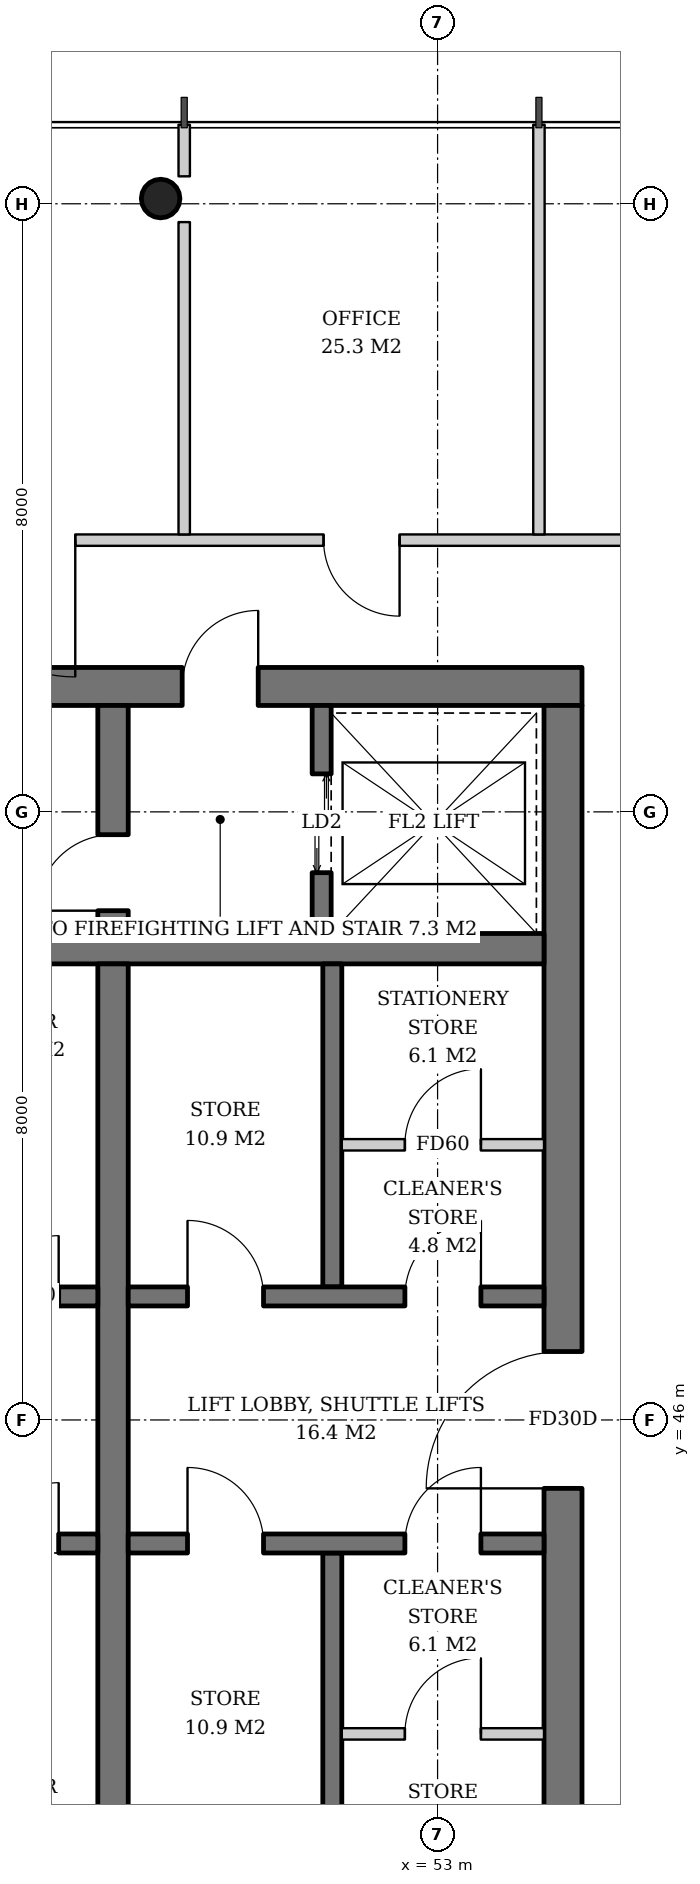
"""IFC4 building model, lengths in metres.
Left out: names, types, materials, properties, quantities, classifications, styles, units other than length and angle.
Written with IfcOpenShell. Run it as: python <this file> out.ifc"""

import sys

from ifc_helpers import new_model, si_unit, direction, frame, frame_2d, origin, origin_2d, place, context, subcontext, project, spatial, rectangle, hollow_circle, extrude, element, fill, save


model = new_model("IFC4")
c1 = context("Model", 3, precision=1e-05, world=origin(), true_north=direction((0.0, 1.0)))
c2 = subcontext(c1, "Body", "Model", "MODEL_VIEW")
j1 = project(units=[si_unit("LENGTHUNIT", "METRE"), si_unit("PLANEANGLEUNIT", "RADIAN")], contexts=[c1])
p1 = place(None, origin())
s1 = spatial("IfcSite", under=j1, at=p1, CompositionType="ELEMENT")
p2 = place(p1, origin())
s2 = spatial("IfcBuilding", under=s1, at=p2, CompositionType="ELEMENT")
p3 = place(p2, frame((0.0, 0.0, 268.0)))
s3 = spatial("IfcBuildingStorey", under=s2, at=p3, CompositionType="ELEMENT", Elevation=268.0)
p4 = place(p3, frame((49.369, 62.107, 0.0), z_axis=(-0.010658893366, -0.031976680097, 0.999431778523), x_axis=(0.948683298051, -0.316227766017, 0.0)))
e1 = element("IfcColumn", 1, at=p4, inside=s3, PredefinedType="COLUMN", context=c2, shape_type="SweptSolid", body=[
    extrude(hollow_circle(Radius=0.254, WallThickness=0.02, at=origin_2d()), origin(), (0.0, 0.0, 1.0), 3.802),
])
p5 = place(p3, frame((35.1, 55.65, 0.0), z_axis=(0.0, 0.0, 1.0), x_axis=(1.0, 0.0, 0.0)))
e2 = element("IfcWall", 2, at=p5, inside=s3, PredefinedType="SHEAR", context=c2, shape_type="SweptSolid", body=[
    extrude(rectangle(XDim=19.8, YDim=0.5, at=frame_2d((9.9, 0.0))), origin(), (0.0, 0.0, 1.0), 3.8),
])
p6 = place(p5, frame((14.54, 0.0, 0.0)))
e3 = element("IfcOpeningElement", 3, at=p6, cuts=e2, PredefinedType="OPENING", context=c2, shape_type="SweptSolid", body=[
    extrude(rectangle(XDim=1.0, YDim=2.1, at=frame_2d((0.5, 1.05))), frame((0.0, 0.26, 0.0), z_axis=(0.0, -1.0, 0.0), x_axis=(1.0, 0.0, 0.0)), (0.0, 0.0, 1.0), 0.52),
])
p7 = place(p5, frame((1.75, 0.0, 0.0)))
e4 = element("IfcOpeningElement", 4, at=p7, cuts=e2, PredefinedType="OPENING", context=c2, shape_type="SweptSolid", body=[
    extrude(rectangle(XDim=1.0, YDim=2.1, at=frame_2d((0.5, 1.05))), frame((0.0, 0.26, 0.0), z_axis=(0.0, -1.0, 0.0), x_axis=(1.0, 0.0, 0.0)), (0.0, 0.0, 1.0), 0.52),
])
p8 = place(p5, frame((3.705, 0.0, 0.0)))
e5 = element("IfcOpeningElement", 5, at=p8, cuts=e2, PredefinedType="OPENING", context=c2, shape_type="SweptSolid", body=[
    extrude(rectangle(XDim=1.0, YDim=2.1, at=frame_2d((0.5, 1.05))), frame((0.0, 0.26, 0.0), z_axis=(0.0, -1.0, 0.0), x_axis=(1.0, 0.0, 0.0)), (0.0, 0.0, 1.0), 0.52),
])
p9 = place(p3, frame((54.65, 36.6, 0.0), z_axis=(0.0, 0.0, 1.0), x_axis=(0.0, 1.0, 0.0)))
e6 = element("IfcWall", 6, at=p9, inside=s3, PredefinedType="SHEAR", context=c2, shape_type="SweptSolid", body=[
    extrude(rectangle(XDim=18.8, YDim=0.5, at=frame_2d((9.4, 0.0))), origin(), (0.0, 0.0, 1.0), 3.8),
])
p10 = place(p9, frame((8.5, 0.0, 0.0)))
e7 = element("IfcOpeningElement", 7, at=p10, cuts=e6, PredefinedType="OPENING", context=c2, shape_type="SweptSolid", body=[
    extrude(rectangle(XDim=1.8, YDim=2.4, at=frame_2d((0.9, 1.2))), frame((0.0, 0.26, 0.0), z_axis=(0.0, -1.0, 0.0), x_axis=(1.0, 0.0, 0.0)), (0.0, 0.0, 1.0), 0.52),
])
p11 = place(p3, frame((35.6, 52.2, 0.0), z_axis=(0.0, 0.0, 1.0), x_axis=(1.0, 0.0, 0.0)))
e8 = element("IfcWall", 8, at=p11, inside=s3, PredefinedType="SHEAR", context=c2, shape_type="SweptSolid", body=[
    extrude(rectangle(XDim=18.8, YDim=0.4, at=frame_2d((9.4, 0.0))), origin(), (0.0, 0.0, 1.0), 3.8),
])
p12 = place(p3, frame((48.73, 40.0, 0.0), z_axis=(0.0, 0.0, 1.0), x_axis=(0.0, 1.0, 0.0)))
e9 = element("IfcWall", 9, at=p12, inside=s3, PredefinedType="SHEAR", context=c2, shape_type="SweptSolid", body=[
    extrude(rectangle(XDim=12.0, YDim=0.4, at=frame_2d((6.0, 0.0))), origin(), (0.0, 0.0, 1.0), 3.8),
])
p13 = place(p3, frame((48.73, 52.4, 0.0), z_axis=(0.0, 0.0, 1.0), x_axis=(0.0, 1.0, 0.0)))
e10 = element("IfcWall", 10, at=p13, inside=s3, PredefinedType="SHEAR", context=c2, shape_type="SweptSolid", body=[
    extrude(rectangle(XDim=3.0, YDim=0.4, at=frame_2d((1.5, 0.0))), origin(), (0.0, 0.0, 1.0), 3.8),
])
p14 = place(p13, frame((0.3, 0.0, 0.0)))
e11 = element("IfcOpeningElement", 11, at=p14, cuts=e10, PredefinedType="OPENING", context=c2, shape_type="SweptSolid", body=[
    extrude(rectangle(XDim=1.0, YDim=2.1, at=frame_2d((0.5, 1.05))), frame((0.0, 0.21, 0.0), z_axis=(0.0, -1.0, 0.0), x_axis=(1.0, 0.0, 0.0)), (0.0, 0.0, 1.0), 0.42),
])
p15 = place(p3, frame((51.475, 52.4, 0.0), z_axis=(0.0, 0.0, 1.0), x_axis=(0.0, 1.0, 0.0)))
e12 = element("IfcWall", 12, at=p15, inside=s3, PredefinedType="SHEAR", context=c2, shape_type="SweptSolid", body=[
    extrude(rectangle(XDim=3.0, YDim=0.25, at=frame_2d((1.5, 0.0))), origin(), (0.0, 0.0, 1.0), 3.8),
])
p16 = place(p15, frame((0.8, 0.0, 0.0)))
e13 = element("IfcOpeningElement", 13, at=p16, cuts=e12, PredefinedType="OPENING", context=c2, shape_type="SweptSolid", body=[
    extrude(rectangle(XDim=1.3, YDim=2.2, at=frame_2d((0.65, 1.1))), frame((0.0, 0.135, 0.0), z_axis=(0.0, -1.0, 0.0), x_axis=(1.0, 0.0, 0.0)), (0.0, 0.0, 1.0), 0.27),
])
p17 = place(p3, frame((35.6, 47.625, 0.0), z_axis=(0.0, 0.0, 1.0), x_axis=(1.0, 0.0, 0.0)))
e14 = element("IfcWall", 14, at=p17, inside=s3, PredefinedType="SHEAR", context=c2, shape_type="SweptSolid", body=[
    extrude(rectangle(XDim=12.93, YDim=0.25, at=frame_2d((6.465, 0.0))), origin(), (0.0, 0.0, 1.0), 3.8),
])
p18 = place(p17, frame((0.75, 0.0, 0.0)))
e15 = element("IfcOpeningElement", 15, at=p18, cuts=e14, PredefinedType="OPENING", context=c2, shape_type="SweptSolid", body=[
    extrude(rectangle(XDim=1.1, YDim=2.2, at=frame_2d((0.55, 1.1))), frame((0.0, 0.135, 0.0), z_axis=(0.0, -1.0, 0.0), x_axis=(1.0, 0.0, 0.0)), (0.0, 0.0, 1.0), 0.27),
])
p19 = place(p17, frame((3.55, 0.0, 0.0)))
e16 = element("IfcOpeningElement", 16, at=p19, cuts=e14, PredefinedType="OPENING", context=c2, shape_type="SweptSolid", body=[
    extrude(rectangle(XDim=1.1, YDim=2.2, at=frame_2d((0.55, 1.1))), frame((0.0, 0.135, 0.0), z_axis=(0.0, -1.0, 0.0), x_axis=(1.0, 0.0, 0.0)), (0.0, 0.0, 1.0), 0.27),
])
p20 = place(p17, frame((6.3, 0.0, 0.0)))
e17 = element("IfcOpeningElement", 17, at=p20, cuts=e14, PredefinedType="OPENING", context=c2, shape_type="SweptSolid", body=[
    extrude(rectangle(XDim=1.1, YDim=2.2, at=frame_2d((0.55, 1.1))), frame((0.0, 0.135, 0.0), z_axis=(0.0, -1.0, 0.0), x_axis=(1.0, 0.0, 0.0)), (0.0, 0.0, 1.0), 0.27),
])
p21 = place(p17, frame((9.1, 0.0, 0.0)))
e18 = element("IfcOpeningElement", 18, at=p21, cuts=e14, PredefinedType="OPENING", context=c2, shape_type="SweptSolid", body=[
    extrude(rectangle(XDim=1.0, YDim=2.1, at=frame_2d((0.5, 1.05))), frame((0.0, 0.135, 0.0), z_axis=(0.0, -1.0, 0.0), x_axis=(1.0, 0.0, 0.0)), (0.0, 0.0, 1.0), 0.27),
])
p22 = place(p17, frame((11.615, 0.0, 0.0)))
e19 = element("IfcOpeningElement", 19, at=p22, cuts=e14, PredefinedType="OPENING", context=c2, shape_type="SweptSolid", body=[
    extrude(rectangle(XDim=0.8, YDim=2.0, at=frame_2d((0.4, 1.0))), frame((0.0, 0.135, 0.0), z_axis=(0.0, -1.0, 0.0), x_axis=(1.0, 0.0, 0.0)), (0.0, 0.0, 1.0), 0.27),
])
p23 = place(p3, frame((35.6, 44.375, 0.0), z_axis=(0.0, 0.0, 1.0), x_axis=(1.0, 0.0, 0.0)))
e20 = element("IfcWall", 20, at=p23, inside=s3, PredefinedType="SHEAR", context=c2, shape_type="SweptSolid", body=[
    extrude(rectangle(XDim=12.93, YDim=0.25, at=frame_2d((6.465, 0.0))), origin(), (0.0, 0.0, 1.0), 3.8),
])
p24 = place(p23, frame((0.75, 0.0, 0.0)))
e21 = element("IfcOpeningElement", 21, at=p24, cuts=e20, PredefinedType="OPENING", context=c2, shape_type="SweptSolid", body=[
    extrude(rectangle(XDim=1.1, YDim=2.2, at=frame_2d((0.55, 1.1))), frame((0.0, 0.135, 0.0), z_axis=(0.0, -1.0, 0.0), x_axis=(1.0, 0.0, 0.0)), (0.0, 0.0, 1.0), 0.27),
])
p25 = place(p23, frame((3.55, 0.0, 0.0)))
e22 = element("IfcOpeningElement", 22, at=p25, cuts=e20, PredefinedType="OPENING", context=c2, shape_type="SweptSolid", body=[
    extrude(rectangle(XDim=1.1, YDim=2.2, at=frame_2d((0.55, 1.1))), frame((0.0, 0.135, 0.0), z_axis=(0.0, -1.0, 0.0), x_axis=(1.0, 0.0, 0.0)), (0.0, 0.0, 1.0), 0.27),
])
p26 = place(p23, frame((6.3, 0.0, 0.0)))
e23 = element("IfcOpeningElement", 23, at=p26, cuts=e20, PredefinedType="OPENING", context=c2, shape_type="SweptSolid", body=[
    extrude(rectangle(XDim=1.1, YDim=2.2, at=frame_2d((0.55, 1.1))), frame((0.0, 0.135, 0.0), z_axis=(0.0, -1.0, 0.0), x_axis=(1.0, 0.0, 0.0)), (0.0, 0.0, 1.0), 0.27),
])
p27 = place(p23, frame((9.1, 0.0, 0.0)))
e24 = element("IfcOpeningElement", 24, at=p27, cuts=e20, PredefinedType="OPENING", context=c2, shape_type="SweptSolid", body=[
    extrude(rectangle(XDim=1.0, YDim=2.1, at=frame_2d((0.5, 1.05))), frame((0.0, 0.135, 0.0), z_axis=(0.0, -1.0, 0.0), x_axis=(1.0, 0.0, 0.0)), (0.0, 0.0, 1.0), 0.27),
])
p28 = place(p23, frame((11.615, 0.0, 0.0)))
e25 = element("IfcOpeningElement", 25, at=p28, cuts=e20, PredefinedType="OPENING", context=c2, shape_type="SweptSolid", body=[
    extrude(rectangle(XDim=0.8, YDim=2.0, at=frame_2d((0.4, 1.0))), frame((0.0, 0.135, 0.0), z_axis=(0.0, -1.0, 0.0), x_axis=(1.0, 0.0, 0.0)), (0.0, 0.0, 1.0), 0.27),
])
p29 = place(p3, frame((51.615, 47.75, 0.0), z_axis=(0.0, 0.0, 1.0), x_axis=(0.0, 1.0, 0.0)))
e26 = element("IfcWall", 26, at=p29, inside=s3, PredefinedType="SHEAR", context=c2, shape_type="SweptSolid", body=[
    extrude(rectangle(XDim=4.25, YDim=0.25, at=frame_2d((2.125, 0.0))), origin(), (0.0, 0.0, 1.0), 3.8),
])
p30 = place(p3, frame((48.93, 47.625, 0.0), z_axis=(0.0, 0.0, 1.0), x_axis=(1.0, 0.0, 0.0)))
e27 = element("IfcWall", 27, at=p30, inside=s3, PredefinedType="SHEAR", context=c2, shape_type="SweptSolid", body=[
    extrude(rectangle(XDim=5.47, YDim=0.25, at=frame_2d((2.735, 0.0))), origin(), (0.0, 0.0, 1.0), 3.8),
])
p31 = place(p30, frame((0.78, 0.0, 0.0)))
e28 = element("IfcOpeningElement", 28, at=p31, cuts=e27, PredefinedType="OPENING", context=c2, shape_type="SweptSolid", body=[
    extrude(rectangle(XDim=1.0, YDim=2.1, at=frame_2d((0.5, 1.05))), frame((0.0, 0.135, 0.0), z_axis=(0.0, -1.0, 0.0), x_axis=(1.0, 0.0, 0.0)), (0.0, 0.0, 1.0), 0.27),
])
p32 = place(p30, frame((3.64, 0.0, 0.0)))
e29 = element("IfcOpeningElement", 29, at=p32, cuts=e27, PredefinedType="OPENING", context=c2, shape_type="SweptSolid", body=[
    extrude(rectangle(XDim=1.0, YDim=2.1, at=frame_2d((0.5, 1.05))), frame((0.0, 0.135, 0.0), z_axis=(0.0, -1.0, 0.0), x_axis=(1.0, 0.0, 0.0)), (0.0, 0.0, 1.0), 0.27),
])
p33 = place(p3, frame((51.615, 44.25, 0.0), z_axis=(0.0, 0.0, 1.0), x_axis=(0.0, -1.0, 0.0)))
e30 = element("IfcWall", 30, at=p33, inside=s3, PredefinedType="SHEAR", context=c2, shape_type="SweptSolid", body=[
    extrude(rectangle(XDim=4.25, YDim=0.25, at=frame_2d((2.125, 0.0))), origin(), (0.0, 0.0, 1.0), 3.8),
])
p34 = place(p3, frame((48.93, 44.375, 0.0), z_axis=(0.0, 0.0, 1.0), x_axis=(1.0, 0.0, 0.0)))
e31 = element("IfcWall", 31, at=p34, inside=s3, PredefinedType="SHEAR", context=c2, shape_type="SweptSolid", body=[
    extrude(rectangle(XDim=5.47, YDim=0.25, at=frame_2d((2.735, 0.0))), origin(), (0.0, 0.0, 1.0), 3.8),
])
p35 = place(p34, frame((0.78, 0.0, 0.0)))
e32 = element("IfcOpeningElement", 32, at=p35, cuts=e31, PredefinedType="OPENING", context=c2, shape_type="SweptSolid", body=[
    extrude(rectangle(XDim=1.0, YDim=2.1, at=frame_2d((0.5, 1.05))), frame((0.0, 0.135, 0.0), z_axis=(0.0, -1.0, 0.0), x_axis=(1.0, 0.0, 0.0)), (0.0, 0.0, 1.0), 0.27),
])
p36 = place(p34, frame((3.64, 0.0, 0.0)))
e33 = element("IfcOpeningElement", 33, at=p36, cuts=e31, PredefinedType="OPENING", context=c2, shape_type="SweptSolid", body=[
    extrude(rectangle(XDim=1.0, YDim=2.1, at=frame_2d((0.5, 1.05))), frame((0.0, 0.135, 0.0), z_axis=(0.0, -1.0, 0.0), x_axis=(1.0, 0.0, 0.0)), (0.0, 0.0, 1.0), 0.27),
])
p37 = place(p3, frame((51.74, 49.62, 0.0), z_axis=(0.0, 0.0, 1.0), x_axis=(1.0, 0.0, 0.0)))
e34 = element("IfcWall", 34, at=p37, inside=s3, PredefinedType="SOLIDWALL", context=c2, shape_type="SweptSolid", body=[
    extrude(rectangle(XDim=2.66, YDim=0.15, at=frame_2d((1.33, 0.0))), origin(), (0.0, 0.0, 1.0), 3.62),
])
p38 = place(p37, frame((0.83, 0.0, 0.0)))
e35 = element("IfcOpeningElement", 35, at=p38, cuts=e34, PredefinedType="OPENING", context=c2, shape_type="SweptSolid", body=[
    extrude(rectangle(XDim=1.0, YDim=2.1, at=frame_2d((0.5, 1.05))), frame((0.0, 0.085, 0.0), z_axis=(0.0, -1.0, 0.0), x_axis=(1.0, 0.0, 0.0)), (0.0, 0.0, 1.0), 0.17),
])
p39 = place(p3, frame((51.74, 41.87, 0.0), z_axis=(0.0, 0.0, 1.0), x_axis=(1.0, 0.0, 0.0)))
e36 = element("IfcWall", 36, at=p39, inside=s3, PredefinedType="SOLIDWALL", context=c2, shape_type="SweptSolid", body=[
    extrude(rectangle(XDim=2.66, YDim=0.15, at=frame_2d((1.33, 0.0))), origin(), (0.0, 0.0, 1.0), 3.62),
])
p40 = place(p39, frame((0.83, 0.0, 0.0)))
e37 = element("IfcOpeningElement", 37, at=p40, cuts=e36, PredefinedType="OPENING", context=c2, shape_type="SweptSolid", body=[
    extrude(rectangle(XDim=1.0, YDim=2.1, at=frame_2d((0.5, 1.05))), frame((0.0, 0.085, 0.0), z_axis=(0.0, -1.0, 0.0), x_axis=(1.0, 0.0, 0.0)), (0.0, 0.0, 1.0), 0.17),
])
p41 = place(p3, frame((56.273, 57.575, 0.0), z_axis=(0.0, 0.0, 1.0), x_axis=(-1.0, 0.0, 0.0)))
e38 = element("IfcWall", 38, at=p41, inside=s3, PredefinedType="PARTITIONING", context=c2, shape_type="SweptSolid", body=[
    extrude(rectangle(XDim=22.546, YDim=0.15, at=frame_2d((11.273, 0.0))), origin(), (0.0, 0.0, 1.0), 3.02),
])
p42 = place(p41, frame((3.773, 0.0, 0.0)))
e39 = element("IfcOpeningElement", 39, at=p42, cuts=e38, PredefinedType="OPENING", context=c2, shape_type="SweptSolid", body=[
    extrude(rectangle(XDim=1.0, YDim=2.1, at=frame_2d((0.5, 1.05))), frame((0.0, 0.085, 0.0), z_axis=(0.0, -1.0, 0.0), x_axis=(1.0, 0.0, 0.0)), (0.0, 0.0, 1.0), 0.17),
])
p43 = place(p41, frame((8.04, 0.0, 0.0)))
e40 = element("IfcOpeningElement", 40, at=p43, cuts=e38, PredefinedType="OPENING", context=c2, shape_type="SweptSolid", body=[
    extrude(rectangle(XDim=1.8, YDim=2.4, at=frame_2d((0.9, 1.2))), frame((0.0, 0.085, 0.0), z_axis=(0.0, -1.0, 0.0), x_axis=(1.0, 0.0, 0.0)), (0.0, 0.0, 1.0), 0.17),
])
p44 = place(p41, frame((17.773, 0.0, 0.0)))
e41 = element("IfcOpeningElement", 41, at=p44, cuts=e38, PredefinedType="OPENING", context=c2, shape_type="SweptSolid", body=[
    extrude(rectangle(XDim=1.0, YDim=2.1, at=frame_2d((0.5, 1.05))), frame((0.0, 0.085, 0.0), z_axis=(0.0, -1.0, 0.0), x_axis=(1.0, 0.0, 0.0)), (0.0, 0.0, 1.0), 0.17),
])
p45 = place(p3, frame((54.333, 57.65, 0.0), z_axis=(0.0, 0.0, 1.0), x_axis=(0.0, 1.0, 0.0)))
e42 = element("IfcWall", 42, at=p45, inside=s3, PredefinedType="PARTITIONING", context=c2, shape_type="SweptSolid", body=[
    extrude(rectangle(XDim=5.39, YDim=0.15, at=frame_2d((2.695, 0.0))), origin(), (0.0, 0.0, 1.0), 3.12),
])
p46 = place(p3, frame((49.667, 57.65, 0.0), z_axis=(0.0, 0.0, 1.0), x_axis=(0.0, 1.0, 0.0)))
e43 = element("IfcWall", 43, at=p46, inside=s3, PredefinedType="PARTITIONING", context=c2, shape_type="SweptSolid", body=[
    extrude(rectangle(XDim=4.109, YDim=0.15, at=frame_2d((2.055, 0.0))), origin(), (0.0, 0.0, 1.0), 3.62),
])
p47 = place(p3, frame((49.667, 62.361, 0.0), z_axis=(0.0, 0.0, 1.0), x_axis=(0.0, 1.0, 0.0)))
e44 = element("IfcWall", 44, at=p47, inside=s3, PredefinedType="PARTITIONING", context=c2, shape_type="SweptSolid", body=[
    extrude(rectangle(XDim=0.679, YDim=0.15, at=frame_2d((0.339, 0.0))), origin(), (0.0, 0.0, 1.0), 3.62),
])
p48 = place(p16, origin())
e45 = element("IfcDoor", 45, at=p48, inside=s3, OperationType="DOUBLE_DOOR_SLIDING", PredefinedType="DOOR", context=c2, shape_type="SweptSolid", body=[
    extrude(rectangle(XDim=1.3, YDim=2.2, at=frame_2d((0.65, 1.1))), frame((0.0, 0.025, 0.0), z_axis=(0.0, -1.0, 0.0), x_axis=(1.0, 0.0, 0.0)), (0.0, 0.0, 1.0), 0.05),
])
fill(e13, e45)
p49 = place(p22, origin())
e46 = element("IfcDoor", 46, at=p49, inside=s3, OperationType="SINGLE_SWING_RIGHT", PredefinedType="DOOR", context=c2, shape_type="SweptSolid", body=[
    extrude(rectangle(XDim=0.8, YDim=2.0, at=frame_2d((0.4, 1.0))), frame((0.0, 0.025, 0.0), z_axis=(0.0, -1.0, 0.0), x_axis=(1.0, 0.0, 0.0)), (0.0, 0.0, 1.0), 0.05),
])
fill(e19, e46)
p50 = place(p28, origin())
e47 = element("IfcDoor", 47, at=p50, inside=s3, OperationType="SINGLE_SWING_RIGHT", PredefinedType="DOOR", context=c2, shape_type="SweptSolid", body=[
    extrude(rectangle(XDim=0.8, YDim=2.0, at=frame_2d((0.4, 1.0))), frame((0.0, 0.025, 0.0), z_axis=(0.0, -1.0, 0.0), x_axis=(1.0, 0.0, 0.0)), (0.0, 0.0, 1.0), 0.05),
])
fill(e25, e47)
p51 = place(p31, origin())
e48 = element("IfcDoor", 48, at=p51, inside=s3, OperationType="SINGLE_SWING_LEFT", PredefinedType="DOOR", context=c2, shape_type="SweptSolid", body=[
    extrude(rectangle(XDim=1.0, YDim=2.1, at=frame_2d((0.5, 1.05))), frame((0.0, 0.025, 0.0), z_axis=(0.0, -1.0, 0.0), x_axis=(1.0, 0.0, 0.0)), (0.0, 0.0, 1.0), 0.05),
])
fill(e28, e48)
p52 = place(p32, origin())
e49 = element("IfcDoor", 49, at=p52, inside=s3, OperationType="SINGLE_SWING_RIGHT", PredefinedType="DOOR", context=c2, shape_type="SweptSolid", body=[
    extrude(rectangle(XDim=1.0, YDim=2.1, at=frame_2d((0.5, 1.05))), frame((0.0, 0.025, 0.0), z_axis=(0.0, -1.0, 0.0), x_axis=(1.0, 0.0, 0.0)), (0.0, 0.0, 1.0), 0.05),
])
fill(e29, e49)
p53 = place(p35, origin())
e50 = element("IfcDoor", 50, at=p53, inside=s3, OperationType="SINGLE_SWING_LEFT", PredefinedType="DOOR", context=c2, shape_type="SweptSolid", body=[
    extrude(rectangle(XDim=1.0, YDim=2.1, at=frame_2d((0.5, 1.05))), frame((0.0, 0.025, 0.0), z_axis=(0.0, -1.0, 0.0), x_axis=(1.0, 0.0, 0.0)), (0.0, 0.0, 1.0), 0.05),
])
fill(e32, e50)
p54 = place(p36, origin())
e51 = element("IfcDoor", 51, at=p54, inside=s3, OperationType="SINGLE_SWING_RIGHT", PredefinedType="DOOR", context=c2, shape_type="SweptSolid", body=[
    extrude(rectangle(XDim=1.0, YDim=2.1, at=frame_2d((0.5, 1.05))), frame((0.0, 0.025, 0.0), z_axis=(0.0, -1.0, 0.0), x_axis=(1.0, 0.0, 0.0)), (0.0, 0.0, 1.0), 0.05),
])
fill(e33, e51)
p55 = place(p38, origin())
e52 = element("IfcDoor", 52, at=p55, inside=s3, OperationType="SINGLE_SWING_RIGHT", PredefinedType="DOOR", context=c2, shape_type="SweptSolid", body=[
    extrude(rectangle(XDim=1.0, YDim=2.1, at=frame_2d((0.5, 1.05))), frame((0.0, 0.025, 0.0), z_axis=(0.0, -1.0, 0.0), x_axis=(1.0, 0.0, 0.0)), (0.0, 0.0, 1.0), 0.05),
])
fill(e35, e52)
p56 = place(p40, origin())
e53 = element("IfcDoor", 53, at=p56, inside=s3, OperationType="SINGLE_SWING_RIGHT", PredefinedType="DOOR", context=c2, shape_type="SweptSolid", body=[
    extrude(rectangle(XDim=1.0, YDim=2.1, at=frame_2d((0.5, 1.05))), frame((0.0, 0.025, 0.0), z_axis=(0.0, -1.0, 0.0), x_axis=(1.0, 0.0, 0.0)), (0.0, 0.0, 1.0), 0.05),
])
fill(e37, e53)
p57 = place(p14, origin())
e54 = element("IfcDoor", 54, at=p57, inside=s3, OperationType="SINGLE_SWING_LEFT", PredefinedType="DOOR", context=c2, shape_type="SweptSolid", body=[
    extrude(rectangle(XDim=1.0, YDim=2.1, at=frame_2d((0.5, 1.05))), frame((0.0, 0.025, 0.0), z_axis=(0.0, -1.0, 0.0), x_axis=(1.0, 0.0, 0.0)), (0.0, 0.0, 1.0), 0.05),
])
fill(e11, e54)
p58 = place(p6, origin())
e55 = element("IfcDoor", 55, at=p58, inside=s3, OperationType="SINGLE_SWING_RIGHT", PredefinedType="DOOR", context=c2, shape_type="SweptSolid", body=[
    extrude(rectangle(XDim=1.0, YDim=2.1, at=frame_2d((0.5, 1.05))), frame((0.0, 0.025, 0.0), z_axis=(0.0, -1.0, 0.0), x_axis=(1.0, 0.0, 0.0)), (0.0, 0.0, 1.0), 0.05),
])
fill(e3, e55)
p59 = place(p10, origin())
e56 = element("IfcDoor", 56, at=p59, inside=s3, OperationType="DOUBLE_DOOR_SINGLE_SWING", PredefinedType="DOOR", context=c2, shape_type="SweptSolid", body=[
    extrude(rectangle(XDim=1.8, YDim=2.4, at=frame_2d((0.9, 1.2))), frame((0.0, 0.025, 0.0), z_axis=(0.0, -1.0, 0.0), x_axis=(1.0, 0.0, 0.0)), (0.0, 0.0, 1.0), 0.05),
])
fill(e7, e56)
p60 = place(p42, origin())
e57 = element("IfcDoor", 57, at=p60, inside=s3, OperationType="SINGLE_SWING_LEFT", PredefinedType="DOOR", context=c2, shape_type="SweptSolid", body=[
    extrude(rectangle(XDim=1.0, YDim=2.1, at=frame_2d((0.5, 1.05))), frame((0.0, 0.025, 0.0), z_axis=(0.0, -1.0, 0.0), x_axis=(1.0, 0.0, 0.0)), (0.0, 0.0, 1.0), 0.05),
])
fill(e39, e57)
p61 = place(p43, origin())
e58 = element("IfcDoor", 58, at=p61, inside=s3, OperationType="DOUBLE_DOOR_SINGLE_SWING", PredefinedType="DOOR", context=c2, shape_type="SweptSolid", body=[
    extrude(rectangle(XDim=1.8, YDim=2.4, at=frame_2d((0.9, 1.2))), frame((0.0, 0.025, 0.0), z_axis=(0.0, -1.0, 0.0), x_axis=(1.0, 0.0, 0.0)), (0.0, 0.0, 1.0), 0.05),
])
fill(e40, e58)
save(model, sys.argv[1])
